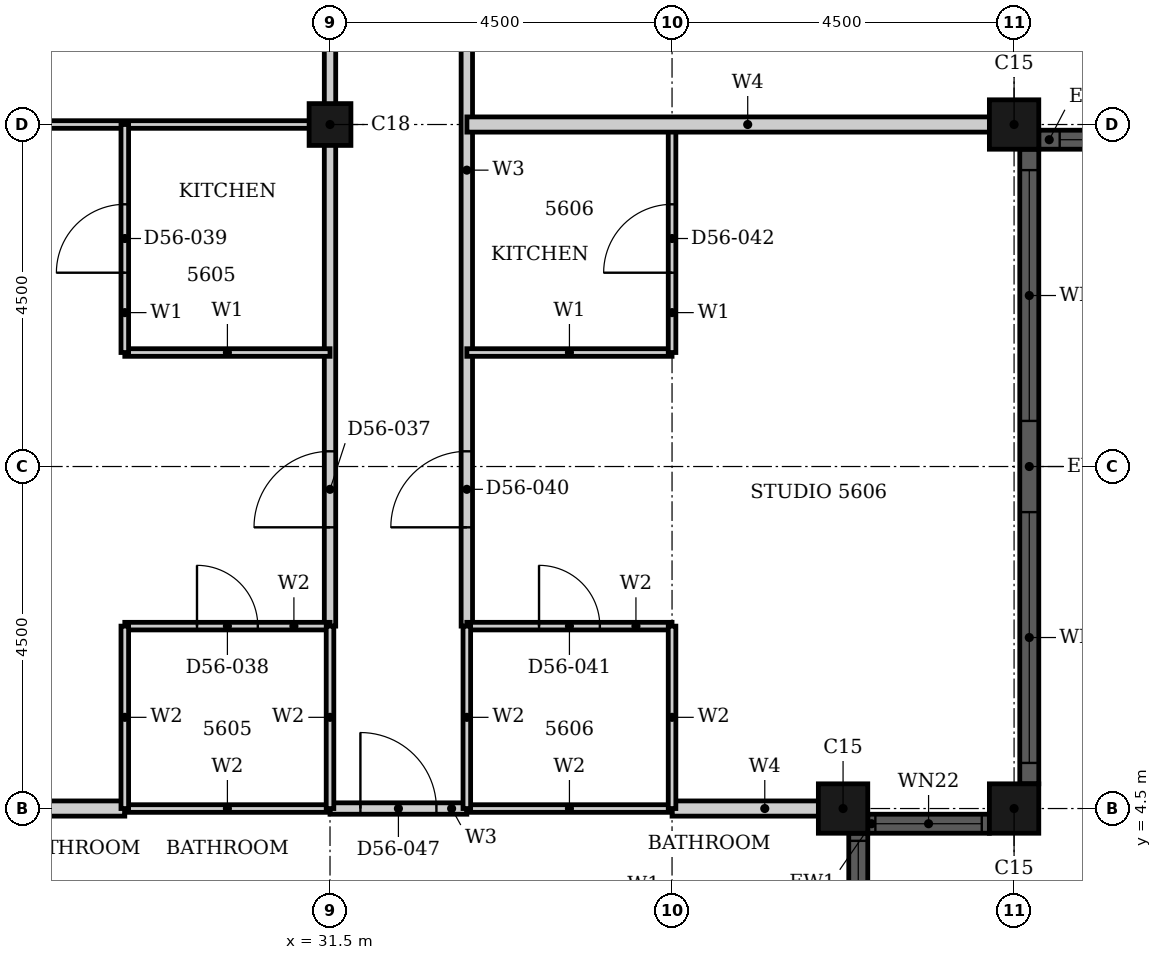
"""IFC4 building model, lengths in metres.
Left out: names, types, materials, properties, quantities, classifications, styles, units other than length and angle.
Written with IfcOpenShell. Run it as: python <this file> out.ifc"""

import sys

from ifc_helpers import new_model, si_unit, direction, frame, frame_2d, origin, origin_2d, place, context, subcontext, project, spatial, rectangle, hollow_rectangle, extrude, element, fill, save


model = new_model("IFC4")
c1 = context("Model", 3, precision=1e-05, world=origin(), true_north=direction((0.0, 1.0)))
c2 = subcontext(c1, "Body", "Model", "MODEL_VIEW")
j1 = project(units=[si_unit("LENGTHUNIT", "METRE"), si_unit("PLANEANGLEUNIT", "RADIAN")], contexts=[c1])
p1 = place(None, origin())
s1 = spatial("IfcSite", under=j1, at=p1, CompositionType="ELEMENT")
p2 = place(p1, origin())
s2 = spatial("IfcBuilding", under=s1, at=p2, CompositionType="ELEMENT")
p3 = place(p2, frame((0.0, 0.0, 222.0)))
s3 = spatial("IfcBuildingStorey", under=s2, at=p3, CompositionType="ELEMENT", Elevation=222.0)
for number, where, z_axis, x_axis in (
    (1, (40.5, 13.5, 0.0), (0.0, 0.0, 1.0), (1.0, 0.0, 0.0)),
    (2, (38.25, 4.5, 0.0), (0.0, 0.0, 1.0), (1.0, 0.0, 0.0)),
    (3, (40.5, 4.5, 0.0), (0.0, 0.0, 1.0), (1.0, 0.0, 0.0)),
):
    element("IfcColumn", number, at=place(p3, frame(where, z_axis=z_axis, x_axis=x_axis)), inside=s3, PredefinedType="COLUMN", context=c2, shape_type="SweptSolid", body=[
        extrude(hollow_rectangle(XDim=0.65, YDim=0.65, WallThickness=0.021, at=origin_2d()), origin(), (0.0, 0.0, 1.0), 3.7),
    ])
p4 = place(p3, frame((31.5, 13.5, 0.0), z_axis=(0.0, 0.0, 1.0), x_axis=(1.0, 0.0, 0.0)))
e4 = element("IfcColumn", 4, at=p4, inside=s3, PredefinedType="COLUMN", context=c2, shape_type="SweptSolid", body=[
    extrude(hollow_rectangle(XDim=0.55, YDim=0.55, WallThickness=0.018, at=origin_2d()), origin(), (0.0, 0.0, 1.0), 3.7),
])
p5 = place(p3, frame((40.825, 13.3, 0.0), z_axis=(0.0, 0.0, 1.0), x_axis=(1.0, 0.0, 0.0)))
e5 = element("IfcWall", 5, at=p5, inside=s3, PredefinedType="SOLIDWALL", context=c2, shape_type="SweptSolid", body=[
    extrude(rectangle(XDim=3.85, YDim=0.25, at=frame_2d((1.925, 0.0))), origin(), (0.0, 0.0, 1.0), 3.7),
])
p6 = place(p5, frame((0.275, 0.0, 0.45)))
e6 = element("IfcOpeningElement", 6, at=p6, cuts=e5, PredefinedType="OPENING", context=c2, shape_type="SweptSolid", body=[
    extrude(rectangle(XDim=3.3, YDim=2.3, at=frame_2d((1.65, 1.15))), frame((0.0, 0.135, 0.0), z_axis=(0.0, -1.0, 0.0), x_axis=(1.0, 0.0, 0.0)), (0.0, 0.0, 1.0), 0.27),
])
p7 = place(p3, frame((38.45, 2.575, 0.0), z_axis=(0.0, 0.0, 1.0), x_axis=(0.0, 1.0, 0.0)))
e7 = element("IfcWall", 7, at=p7, inside=s3, PredefinedType="SOLIDWALL", context=c2, shape_type="SweptSolid", body=[
    extrude(rectangle(XDim=1.6, YDim=0.25, at=frame_2d((0.8, 0.0))), origin(), (0.0, 0.0, 1.0), 3.7),
])
p8 = place(p7, frame((0.1, 0.0, 0.9)))
e8 = element("IfcOpeningElement", 8, at=p8, cuts=e7, PredefinedType="OPENING", context=c2, shape_type="SweptSolid", body=[
    extrude(rectangle(XDim=1.4, YDim=1.85, at=frame_2d((0.7, 0.925))), frame((0.0, 0.135, 0.0), z_axis=(0.0, -1.0, 0.0), x_axis=(1.0, 0.0, 0.0)), (0.0, 0.0, 1.0), 0.27),
])
p9 = place(p3, frame((38.575, 4.3, 0.0), z_axis=(0.0, 0.0, 1.0), x_axis=(1.0, 0.0, 0.0)))
e9 = element("IfcWall", 9, at=p9, inside=s3, PredefinedType="SOLIDWALL", context=c2, shape_type="SweptSolid", body=[
    extrude(rectangle(XDim=1.6, YDim=0.25, at=frame_2d((0.8, 0.0))), origin(), (0.0, 0.0, 1.0), 3.7),
])
p10 = place(p9, frame((0.1, 0.0, 0.9)))
e10 = element("IfcOpeningElement", 10, at=p10, cuts=e9, PredefinedType="OPENING", context=c2, shape_type="SweptSolid", body=[
    extrude(rectangle(XDim=1.4, YDim=1.85, at=frame_2d((0.7, 0.925))), frame((0.0, 0.135, 0.0), z_axis=(0.0, -1.0, 0.0), x_axis=(1.0, 0.0, 0.0)), (0.0, 0.0, 1.0), 0.27),
])
p11 = place(p3, frame((40.7, 4.825, 0.0), z_axis=(0.0, 0.0, 1.0), x_axis=(0.0, 1.0, 0.0)))
e11 = element("IfcWall", 11, at=p11, inside=s3, PredefinedType="SOLIDWALL", context=c2, shape_type="SweptSolid", body=[
    extrude(rectangle(XDim=8.35, YDim=0.25, at=frame_2d((4.175, 0.0))), origin(), (0.0, 0.0, 1.0), 3.7),
])
p12 = place(p11, frame((0.275, 0.0, 0.45)))
e12 = element("IfcOpeningElement", 12, at=p12, cuts=e11, PredefinedType="OPENING", context=c2, shape_type="SweptSolid", body=[
    extrude(rectangle(XDim=3.3, YDim=2.3, at=frame_2d((1.65, 1.15))), frame((0.0, 0.135, 0.0), z_axis=(0.0, -1.0, 0.0), x_axis=(1.0, 0.0, 0.0)), (0.0, 0.0, 1.0), 0.27),
])
p13 = place(p11, frame((4.775, 0.0, 0.45)))
e13 = element("IfcOpeningElement", 13, at=p13, cuts=e11, PredefinedType="OPENING", context=c2, shape_type="SweptSolid", body=[
    extrude(rectangle(XDim=3.3, YDim=2.3, at=frame_2d((1.65, 1.15))), frame((0.0, 0.135, 0.0), z_axis=(0.0, -1.0, 0.0), x_axis=(1.0, 0.0, 0.0)), (0.0, 0.0, 1.0), 0.27),
])
p14 = place(p3, frame((31.5, 4.5, 0.0), z_axis=(0.0, 0.0, 1.0), x_axis=(1.0, 0.0, 0.0)))
e14 = element("IfcWall", 14, at=p14, inside=s3, PredefinedType="PARTITIONING", context=c2, shape_type="SweptSolid", body=[
    extrude(rectangle(XDim=1.8, YDim=0.15, at=frame_2d((0.9, 0.0))), origin(), (0.0, 0.0, 1.0), 3.4),
])
p15 = place(p14, frame((0.4, 0.0, 0.0)))
e15 = element("IfcOpeningElement", 15, at=p15, cuts=e14, PredefinedType="OPENING", context=c2, shape_type="SweptSolid", body=[
    extrude(rectangle(XDim=1.0, YDim=2.2, at=frame_2d((0.5, 1.1))), frame((0.0, 0.085, 0.0), z_axis=(0.0, -1.0, 0.0), x_axis=(1.0, 0.0, 0.0)), (0.0, 0.0, 1.0), 0.17),
])
p16 = place(p3, frame((31.5, 6.9, 0.0), z_axis=(0.0, 0.0, 1.0), x_axis=(0.0, 1.0, 0.0)))
e16 = element("IfcWall", 16, at=p16, inside=s3, PredefinedType="PARTITIONING", context=c2, shape_type="SweptSolid", body=[
    extrude(rectangle(XDim=13.8, YDim=0.15, at=frame_2d((6.9, 0.0))), origin(), (0.0, 0.0, 1.0), 2.68),
])
p17 = place(p16, frame((1.3, 0.0, 0.0)))
e17 = element("IfcOpeningElement", 17, at=p17, cuts=e16, PredefinedType="OPENING", context=c2, shape_type="SweptSolid", body=[
    extrude(rectangle(XDim=1.0, YDim=2.2, at=frame_2d((0.5, 1.1))), frame((0.0, 0.085, 0.0), z_axis=(0.0, -1.0, 0.0), x_axis=(1.0, 0.0, 0.0)), (0.0, 0.0, 1.0), 0.17),
])
p18 = place(p3, frame((33.3, 6.9, 0.0), z_axis=(0.0, 0.0, 1.0), x_axis=(0.0, 1.0, 0.0)))
e18 = element("IfcWall", 18, at=p18, inside=s3, PredefinedType="PARTITIONING", context=c2, shape_type="SweptSolid", body=[
    extrude(rectangle(XDim=13.799, YDim=0.15, at=frame_2d((6.899, 0.0))), origin(), (0.0, 0.0, 1.0), 3.4),
])
p19 = place(p18, frame((9.699, 0.0, 0.0)))
e19 = element("IfcOpeningElement", 19, at=p19, cuts=e18, PredefinedType="OPENING", context=c2, shape_type="SweptSolid", body=[
    extrude(rectangle(XDim=1.0, YDim=2.2, at=frame_2d((0.5, 1.1))), frame((0.0, 0.085, 0.0), z_axis=(0.0, -1.0, 0.0), x_axis=(1.0, 0.0, 0.0)), (0.0, 0.0, 1.0), 0.17),
])
p20 = place(p18, frame((1.3, 0.0, 0.0)))
e20 = element("IfcOpeningElement", 20, at=p20, cuts=e18, PredefinedType="OPENING", context=c2, shape_type="SweptSolid", body=[
    extrude(rectangle(XDim=1.0, YDim=2.2, at=frame_2d((0.5, 1.1))), frame((0.0, 0.085, 0.0), z_axis=(0.0, -1.0, 0.0), x_axis=(1.0, 0.0, 0.0)), (0.0, 0.0, 1.0), 0.17),
])
for number, where, z_axis, x_axis in (
    (21, (33.3, 10.5, 0.0), (0.0, 0.0, 1.0), (1.0, 0.0, 0.0)),
    (22, (28.8, 10.5, 0.0), (0.0, 0.0, 1.0), (1.0, 0.0, 0.0)),
):
    element("IfcWall", number, at=place(p3, frame(where, z_axis=z_axis, x_axis=x_axis)), inside=s3, PredefinedType="PARTITIONING", context=c2, shape_type="SweptSolid", body=[
        extrude(rectangle(XDim=2.7, YDim=0.1, at=frame_2d((1.35, 0.0))), origin(), (0.0, 0.0, 1.0), 3.4),
    ])
p21 = place(p3, frame((22.31, 13.5, 0.0), z_axis=(0.0, 0.0, 1.0), x_axis=(1.0, 0.0, 0.0)))
e23 = element("IfcWall", 23, at=p21, inside=s3, PredefinedType="PARTITIONING", context=c2, shape_type="SweptSolid", body=[
    extrude(rectangle(XDim=9.19, YDim=0.1, at=frame_2d((4.595, 0.0))), origin(), (0.0, 0.0, 1.0), 2.48),
])
p22 = place(p3, frame((28.8, 10.5, 0.0), z_axis=(0.0, 0.0, 1.0), x_axis=(0.0, 1.0, 0.0)))
e24 = element("IfcWall", 24, at=p22, inside=s3, PredefinedType="PARTITIONING", context=c2, shape_type="SweptSolid", body=[
    extrude(rectangle(XDim=3.0, YDim=0.1, at=frame_2d((1.5, 0.0))), origin(), (0.0, 0.0, 1.0), 3.4),
])
p23 = place(p22, frame((1.05, 0.0, 0.0)))
e25 = element("IfcOpeningElement", 25, at=p23, cuts=e24, PredefinedType="OPENING", context=c2, shape_type="SweptSolid", body=[
    extrude(rectangle(XDim=0.9, YDim=2.1, at=frame_2d((0.45, 1.05))), frame((0.0, 0.06, 0.0), z_axis=(0.0, -1.0, 0.0), x_axis=(1.0, 0.0, 0.0)), (0.0, 0.0, 1.0), 0.12),
])
p24 = place(p3, frame((36.0, 10.5, 0.0), z_axis=(0.0, 0.0, 1.0), x_axis=(0.0, 1.0, 0.0)))
e26 = element("IfcWall", 26, at=p24, inside=s3, PredefinedType="PARTITIONING", context=c2, shape_type="SweptSolid", body=[
    extrude(rectangle(XDim=3.0, YDim=0.1, at=frame_2d((1.5, 0.0))), origin(), (0.0, 0.0, 1.0), 2.68),
])
p25 = place(p24, frame((1.05, 0.0, 0.0)))
e27 = element("IfcOpeningElement", 27, at=p25, cuts=e26, PredefinedType="OPENING", context=c2, shape_type="SweptSolid", body=[
    extrude(rectangle(XDim=0.9, YDim=2.1, at=frame_2d((0.45, 1.05))), frame((0.0, 0.06, 0.0), z_axis=(0.0, -1.0, 0.0), x_axis=(1.0, 0.0, 0.0)), (0.0, 0.0, 1.0), 0.12),
])
p26 = place(p3, frame((33.301, 13.5, 0.0), z_axis=(0.0, 0.0, 1.0), x_axis=(1.0, 0.0, 0.0)))
e28 = element("IfcWall", 28, at=p26, inside=s3, PredefinedType="PARTITIONING", context=c2, shape_type="SweptSolid", body=[
    extrude(rectangle(XDim=7.389, YDim=0.2, at=frame_2d((3.694, 0.0))), origin(), (0.0, 0.0, 1.0), 2.48),
])
p27 = place(p3, frame((36.0, 4.5, 0.0), z_axis=(0.0, 0.0, 1.0), x_axis=(1.0, 0.0, 0.0)))
e29 = element("IfcWall", 29, at=p27, inside=s3, PredefinedType="PARTITIONING", context=c2, shape_type="SweptSolid", body=[
    extrude(rectangle(XDim=2.44, YDim=0.2, at=frame_2d((1.22, 0.0))), origin(), (0.0, 0.0, 1.0), 3.4),
])
p28 = place(p3, frame((24.56, 4.5, 0.0), z_axis=(0.0, 0.0, 1.0), x_axis=(1.0, 0.0, 0.0)))
e30 = element("IfcWall", 30, at=p28, inside=s3, PredefinedType="PARTITIONING", context=c2, shape_type="SweptSolid", body=[
    extrude(rectangle(XDim=4.24, YDim=0.2, at=frame_2d((2.12, 0.0))), origin(), (0.0, 0.0, 1.0), 3.4),
])
for number, where, z_axis, x_axis in (
    (31, (33.3, 4.5, 0.0), (0.0, 0.0, 1.0), (1.0, 0.0, 0.0)),
    (32, (28.8, 4.5, 0.0), (0.0, 0.0, 1.0), (1.0, 0.0, 0.0)),
):
    element("IfcWall", number, at=place(p3, frame(where, z_axis=z_axis, x_axis=x_axis)), inside=s3, PredefinedType="PARTITIONING", context=c2, shape_type="SweptSolid", body=[
        extrude(rectangle(XDim=2.7, YDim=0.1, at=frame_2d((1.35, 0.0))), origin(), (0.0, 0.0, 1.0), 3.4),
    ])
p29 = place(p3, frame((33.3, 6.9, 0.0), z_axis=(0.0, 0.0, 1.0), x_axis=(1.0, 0.0, 0.0)))
e33 = element("IfcWall", 33, at=p29, inside=s3, PredefinedType="PARTITIONING", context=c2, shape_type="SweptSolid", body=[
    extrude(rectangle(XDim=2.7, YDim=0.1, at=frame_2d((1.35, 0.0))), origin(), (0.0, 0.0, 1.0), 3.4),
])
p30 = place(p29, frame((0.95, 0.0, 0.0)))
e34 = element("IfcOpeningElement", 34, at=p30, cuts=e33, PredefinedType="OPENING", context=c2, shape_type="SweptSolid", body=[
    extrude(rectangle(XDim=0.8, YDim=2.1, at=frame_2d((0.4, 1.05))), frame((0.0, 0.06, 0.0), z_axis=(0.0, -1.0, 0.0), x_axis=(1.0, 0.0, 0.0)), (0.0, 0.0, 1.0), 0.12),
])
p31 = place(p3, frame((28.8, 6.9, 0.0), z_axis=(0.0, 0.0, 1.0), x_axis=(1.0, 0.0, 0.0)))
e35 = element("IfcWall", 35, at=p31, inside=s3, PredefinedType="PARTITIONING", context=c2, shape_type="SweptSolid", body=[
    extrude(rectangle(XDim=2.7, YDim=0.1, at=frame_2d((1.35, 0.0))), origin(), (0.0, 0.0, 1.0), 3.4),
])
p32 = place(p31, frame((0.95, 0.0, 0.0)))
e36 = element("IfcOpeningElement", 36, at=p32, cuts=e35, PredefinedType="OPENING", context=c2, shape_type="SweptSolid", body=[
    extrude(rectangle(XDim=0.8, YDim=2.1, at=frame_2d((0.4, 1.05))), frame((0.0, 0.06, 0.0), z_axis=(0.0, -1.0, 0.0), x_axis=(1.0, 0.0, 0.0)), (0.0, 0.0, 1.0), 0.12),
])
p33 = place(p3, frame((28.8, 4.5, 0.0), z_axis=(0.0, 0.0, 1.0), x_axis=(0.0, 1.0, 0.0)))
e37 = element("IfcWall", 37, at=p33, inside=s3, PredefinedType="PARTITIONING", context=c2, shape_type="SweptSolid", body=[
    extrude(rectangle(XDim=2.4, YDim=0.1, at=frame_2d((1.2, 0.0))), origin(), (0.0, 0.0, 1.0), 3.4),
])
p34 = place(p3, frame((31.5, 4.5, 0.0), z_axis=(0.0, 0.0, 1.0), x_axis=(0.0, 1.0, 0.0)))
e38 = element("IfcWall", 38, at=p34, inside=s3, PredefinedType="PARTITIONING", context=c2, shape_type="SweptSolid", body=[
    extrude(rectangle(XDim=2.4, YDim=0.1, at=frame_2d((1.2, 0.0))), origin(), (0.0, 0.0, 1.0), 2.68),
])
p35 = place(p3, frame((33.3, 4.5, 0.0), z_axis=(0.0, 0.0, 1.0), x_axis=(0.0, 1.0, 0.0)))
e39 = element("IfcWall", 39, at=p35, inside=s3, PredefinedType="PARTITIONING", context=c2, shape_type="SweptSolid", body=[
    extrude(rectangle(XDim=2.4, YDim=0.1, at=frame_2d((1.2, 0.0))), origin(), (0.0, 0.0, 1.0), 3.4),
])
p36 = place(p3, frame((36.0, 4.5, 0.0), z_axis=(0.0, 0.0, 1.0), x_axis=(0.0, 1.0, 0.0)))
e40 = element("IfcWall", 40, at=p36, inside=s3, PredefinedType="PARTITIONING", context=c2, shape_type="SweptSolid", body=[
    extrude(rectangle(XDim=2.4, YDim=0.1, at=frame_2d((1.2, 0.0))), origin(), (0.0, 0.0, 1.0), 2.68),
])
p37 = place(p6, origin())
e41 = element("IfcWindow", 41, at=p37, inside=s3, PartitioningType="SINGLE_PANEL", PredefinedType="WINDOW", context=c2, shape_type="SweptSolid", body=[
    extrude(rectangle(XDim=3.3, YDim=2.3, at=frame_2d((1.65, 1.15))), frame((0.0, 0.03, 0.0), z_axis=(0.0, -1.0, 0.0), x_axis=(1.0, 0.0, 0.0)), (0.0, 0.0, 1.0), 0.06),
])
fill(e6, e41)
p38 = place(p8, origin())
e42 = element("IfcWindow", 42, at=p38, inside=s3, PartitioningType="SINGLE_PANEL", PredefinedType="WINDOW", context=c2, shape_type="SweptSolid", body=[
    extrude(rectangle(XDim=1.4, YDim=1.85, at=frame_2d((0.7, 0.925))), frame((0.0, 0.03, 0.0), z_axis=(0.0, -1.0, 0.0), x_axis=(1.0, 0.0, 0.0)), (0.0, 0.0, 1.0), 0.06),
])
fill(e8, e42)
p39 = place(p10, origin())
e43 = element("IfcWindow", 43, at=p39, inside=s3, PartitioningType="SINGLE_PANEL", PredefinedType="WINDOW", context=c2, shape_type="SweptSolid", body=[
    extrude(rectangle(XDim=1.4, YDim=1.85, at=frame_2d((0.7, 0.925))), frame((0.0, 0.03, 0.0), z_axis=(0.0, -1.0, 0.0), x_axis=(1.0, 0.0, 0.0)), (0.0, 0.0, 1.0), 0.06),
])
fill(e10, e43)
p40 = place(p12, origin())
e44 = element("IfcWindow", 44, at=p40, inside=s3, PartitioningType="SINGLE_PANEL", PredefinedType="WINDOW", context=c2, shape_type="SweptSolid", body=[
    extrude(rectangle(XDim=3.3, YDim=2.3, at=frame_2d((1.65, 1.15))), frame((0.0, 0.03, 0.0), z_axis=(0.0, -1.0, 0.0), x_axis=(1.0, 0.0, 0.0)), (0.0, 0.0, 1.0), 0.06),
])
fill(e12, e44)
p41 = place(p13, origin())
e45 = element("IfcWindow", 45, at=p41, inside=s3, PartitioningType="SINGLE_PANEL", PredefinedType="WINDOW", context=c2, shape_type="SweptSolid", body=[
    extrude(rectangle(XDim=3.3, YDim=2.3, at=frame_2d((1.65, 1.15))), frame((0.0, 0.03, 0.0), z_axis=(0.0, -1.0, 0.0), x_axis=(1.0, 0.0, 0.0)), (0.0, 0.0, 1.0), 0.06),
])
fill(e13, e45)
p42 = place(p17, origin())
e46 = element("IfcDoor", 46, at=p42, inside=s3, OperationType="SINGLE_SWING_LEFT", PredefinedType="DOOR", context=c2, shape_type="SweptSolid", body=[
    extrude(rectangle(XDim=1.0, YDim=2.2, at=frame_2d((0.5, 1.1))), frame((0.0, 0.025, 0.0), z_axis=(0.0, -1.0, 0.0), x_axis=(1.0, 0.0, 0.0)), (0.0, 0.0, 1.0), 0.05),
])
fill(e17, e46)
p43 = place(p32, origin())
e47 = element("IfcDoor", 47, at=p43, inside=s3, OperationType="SINGLE_SWING_RIGHT", PredefinedType="DOOR", context=c2, shape_type="SweptSolid", body=[
    extrude(rectangle(XDim=0.8, YDim=2.1, at=frame_2d((0.4, 1.05))), frame((0.0, 0.025, 0.0), z_axis=(0.0, -1.0, 0.0), x_axis=(1.0, 0.0, 0.0)), (0.0, 0.0, 1.0), 0.05),
])
fill(e36, e47)
p44 = place(p23, origin())
e48 = element("IfcDoor", 48, at=p44, inside=s3, OperationType="SINGLE_SWING_RIGHT", PredefinedType="DOOR", context=c2, shape_type="SweptSolid", body=[
    extrude(rectangle(XDim=0.9, YDim=2.1, at=frame_2d((0.45, 1.05))), frame((0.0, 0.025, 0.0), z_axis=(0.0, -1.0, 0.0), x_axis=(1.0, 0.0, 0.0)), (0.0, 0.0, 1.0), 0.05),
])
fill(e25, e48)
p45 = place(p20, origin())
e49 = element("IfcDoor", 49, at=p45, inside=s3, OperationType="SINGLE_SWING_RIGHT", PredefinedType="DOOR", context=c2, shape_type="SweptSolid", body=[
    extrude(rectangle(XDim=1.0, YDim=2.2, at=frame_2d((0.5, 1.1))), frame((0.0, 0.025, 0.0), z_axis=(0.0, -1.0, 0.0), x_axis=(1.0, 0.0, 0.0)), (0.0, 0.0, 1.0), 0.05),
])
fill(e20, e49)
p46 = place(p30, origin())
e50 = element("IfcDoor", 50, at=p46, inside=s3, OperationType="SINGLE_SWING_LEFT", PredefinedType="DOOR", context=c2, shape_type="SweptSolid", body=[
    extrude(rectangle(XDim=0.8, YDim=2.1, at=frame_2d((0.4, 1.05))), frame((0.0, 0.025, 0.0), z_axis=(0.0, -1.0, 0.0), x_axis=(1.0, 0.0, 0.0)), (0.0, 0.0, 1.0), 0.05),
])
fill(e34, e50)
p47 = place(p25, origin())
e51 = element("IfcDoor", 51, at=p47, inside=s3, OperationType="SINGLE_SWING_LEFT", PredefinedType="DOOR", context=c2, shape_type="SweptSolid", body=[
    extrude(rectangle(XDim=0.9, YDim=2.1, at=frame_2d((0.45, 1.05))), frame((0.0, 0.025, 0.0), z_axis=(0.0, -1.0, 0.0), x_axis=(1.0, 0.0, 0.0)), (0.0, 0.0, 1.0), 0.05),
])
fill(e27, e51)
p48 = place(p15, origin())
e52 = element("IfcDoor", 52, at=p48, inside=s3, OperationType="SINGLE_SWING_RIGHT", PredefinedType="DOOR", context=c2, shape_type="SweptSolid", body=[
    extrude(rectangle(XDim=1.0, YDim=2.2, at=frame_2d((0.5, 1.1))), frame((0.0, 0.025, 0.0), z_axis=(0.0, -1.0, 0.0), x_axis=(1.0, 0.0, 0.0)), (0.0, 0.0, 1.0), 0.05),
])
fill(e15, e52)
save(model, sys.argv[1])
